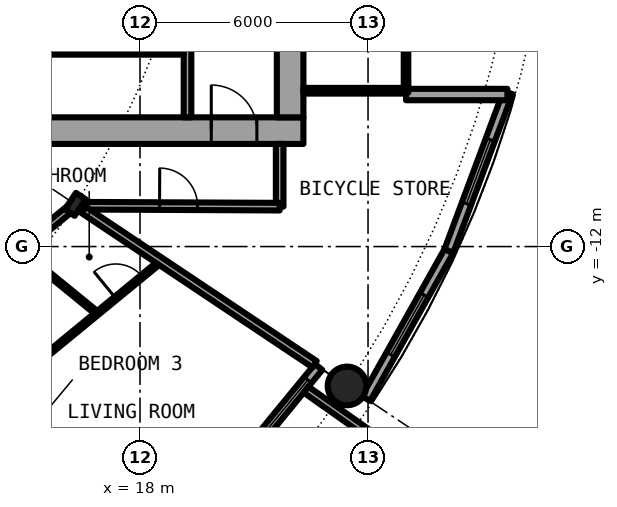
"""IFC4 building model, lengths in metres.
Left out: names, types, materials, properties, quantities, classifications, styles, units other than length and angle.
Written with IfcOpenShell. Run it as: python <this file> out.ifc"""

import sys

from ifc_helpers import new_model, si_unit, direction, frame, frame_2d, origin, origin_2d, place, context, subcontext, project, spatial, rectangle, hollow_circle, i_section, extrude, element, fill, save


model = new_model("IFC4")
c1 = context("Model", 3, precision=1e-05, world=origin(), true_north=direction((0.0, 1.0)))
c2 = subcontext(c1, "Body", "Model", "MODEL_VIEW")
j1 = project(units=[si_unit("LENGTHUNIT", "METRE"), si_unit("PLANEANGLEUNIT", "RADIAN")], contexts=[c1])
p1 = place(None, origin())
s1 = spatial("IfcSite", under=j1, at=p1, CompositionType="ELEMENT")
p2 = place(p1, origin())
s2 = spatial("IfcBuilding", under=s1, at=p2, CompositionType="ELEMENT")
p3 = place(p2, frame((0.0, 0.0, 63.6)))
s3 = spatial("IfcBuildingStorey", under=s2, at=p3, CompositionType="ELEMENT", Elevation=63.6)
p4 = place(p3, frame((23.448, -15.667, 0.0), z_axis=(0.0, 0.0, 1.0), x_axis=(1.0, 0.0, 0.0)))
e1 = element("IfcColumn", 1, at=p4, inside=s3, PredefinedType="COLUMN", context=c2, shape_type="SweptSolid", body=[
    extrude(hollow_circle(Radius=0.508, WallThickness=0.04, at=origin_2d()), origin(), (0.0, 0.0, 1.0), 3.05),
])
p5 = place(p3, frame((16.297, -10.889, 0.0), z_axis=(0.0, 0.0, 1.0), x_axis=(0.831469612303, -0.55557023302, 0.0)))
e2 = element("IfcColumn", 2, at=p5, inside=s3, PredefinedType="COLUMN", context=c2, shape_type="SweptSolid", body=[
    extrude(i_section(OverallWidth=0.306, OverallDepth=0.524, WebThickness=0.021, FlangeThickness=0.04, FilletRadius=0.027, at=origin_2d()), origin(), (0.0, 0.0, 1.0), 3.05),
])
p6 = place(p3, frame((19.304, -19.304, 0.0), z_axis=(0.0, 0.0, 1.0), x_axis=(0.634382322723, 0.773019449054, 0.0)))
e3 = element("IfcWall", 3, at=p6, inside=s3, PredefinedType="SOLIDWALL", context=c2, shape_type="SweptSolid", body=[
    extrude(rectangle(XDim=5.352, YDim=0.25, at=frame_2d((2.676, 0.0))), origin(), (0.0, 0.0, 1.0), 2.7),
])
p7 = place(p6, frame((0.841, 0.0, 0.0)))
e4 = element("IfcOpeningElement", 4, at=p7, cuts=e3, PredefinedType="OPENING", context=c2, shape_type="SweptSolid", body=[
    extrude(rectangle(XDim=1.0, YDim=2.2, at=frame_2d((0.5, 1.1))), frame((0.0, 0.135, 0.0), z_axis=(0.0, -1.0, 0.0), x_axis=(1.0, 0.0, 0.0)), (0.0, 0.0, 1.0), 0.27),
])
p8 = place(p6, frame((3.111, 0.0, 0.3)))
e5 = element("IfcOpeningElement", 5, at=p8, cuts=e3, PredefinedType="OPENING", context=c2, shape_type="SweptSolid", body=[
    extrude(rectangle(XDim=1.8, YDim=2.1, at=frame_2d((0.9, 1.05))), frame((0.0, 0.135, 0.0), z_axis=(0.0, -1.0, 0.0), x_axis=(1.0, 0.0, 0.0)), (0.0, 0.0, 1.0), 0.27),
])
p9 = place(p3, frame((22.37, -15.765, -0.03), z_axis=(0.0, 0.0, 1.0), x_axis=(0.817256123454, -0.576274612209, 0.0)))
e6 = element("IfcWall", 6, at=p9, inside=s3, PredefinedType="SOLIDWALL", context=c2, shape_type="SweptSolid", body=[
    extrude(rectangle(XDim=2.933, YDim=0.2, at=frame_2d((1.466, 0.0))), origin(), (0.0, 0.0, 1.0), 2.73),
])
p10 = place(p3, frame((23.946, -16.0, 0.0), z_axis=(0.0, 0.0, 1.0), x_axis=(0.489696356642, 0.871893042919, 0.0)))
e7 = element("IfcWall", 7, at=p10, inside=s3, PredefinedType="SOLIDWALL", context=c2, shape_type="SweptSolid", body=[
    extrude(rectangle(XDim=4.454, YDim=0.25, at=frame_2d((2.227, 0.0))), origin(), (0.0, 0.0, 1.0), 2.7),
])
p11 = place(p10, frame((1.327, 0.0, 0.3)))
e8 = element("IfcOpeningElement", 8, at=p11, cuts=e7, PredefinedType="OPENING", context=c2, shape_type="SweptSolid", body=[
    extrude(rectangle(XDim=1.8, YDim=2.1, at=frame_2d((0.9, 1.05))), frame((0.0, 0.135, 0.0), z_axis=(0.0, -1.0, 0.0), x_axis=(1.0, 0.0, 0.0)), (0.0, 0.0, 1.0), 0.27),
])
p12 = place(p3, frame((26.127, -12.117, 0.0), z_axis=(0.0, 0.0, 1.0), x_axis=(0.349247811493, 0.937030397675, 0.0)))
e9 = element("IfcWall", 9, at=p12, inside=s3, PredefinedType="SOLIDWALL", context=c2, shape_type="SweptSolid", body=[
    extrude(rectangle(XDim=4.452, YDim=0.25, at=frame_2d((2.226, 0.0))), origin(), (0.0, 0.0, 1.0), 2.7),
])
p13 = place(p12, frame((1.327, 0.0, 0.3)))
e10 = element("IfcOpeningElement", 10, at=p13, cuts=e9, PredefinedType="OPENING", context=c2, shape_type="SweptSolid", body=[
    extrude(rectangle(XDim=1.8, YDim=2.1, at=frame_2d((0.9, 1.05))), frame((0.0, 0.135, 0.0), z_axis=(0.0, -1.0, 0.0), x_axis=(1.0, 0.0, 0.0)), (0.0, 0.0, 1.0), 0.27),
])
p14 = place(p3, frame((25.0, -8.0, 0.0), z_axis=(0.0, 0.0, 1.0), x_axis=(1.0, 0.0, 0.0)))
e11 = element("IfcWall", 11, at=p14, inside=s3, PredefinedType="SOLIDWALL", context=c2, shape_type="SweptSolid", body=[
    extrude(rectangle(XDim=2.667, YDim=0.3, at=frame_2d((1.333, 0.0))), origin(), (0.0, 0.0, 1.0), 2.7),
])
p15 = place(p3, frame((8.3, -8.95, 0.0), z_axis=(0.0, 0.0, 1.0), x_axis=(1.0, 0.0, 0.0)))
e12 = element("IfcWall", 12, at=p15, inside=s3, PredefinedType="SHEAR", context=c2, shape_type="SweptSolid", body=[
    extrude(rectangle(XDim=14.0, YDim=0.7, at=frame_2d((7.0, 0.0))), origin(), (0.0, 0.0, 1.0), 3.05),
])
p16 = place(p15, frame((11.575, 0.0, 0.0)))
e13 = element("IfcOpeningElement", 13, at=p16, cuts=e12, PredefinedType="OPENING", context=c2, shape_type="SweptSolid", body=[
    extrude(rectangle(XDim=1.2, YDim=2.3, at=frame_2d((0.6, 1.15))), frame((0.0, 0.36, 0.0), z_axis=(0.0, -1.0, 0.0), x_axis=(1.0, 0.0, 0.0)), (0.0, 0.0, 1.0), 0.72),
])
p17 = place(p3, frame((21.95, 8.6, 0.0), z_axis=(0.0, 0.0, 1.0), x_axis=(0.0, -1.0, 0.0)))
e14 = element("IfcWall", 14, at=p17, inside=s3, PredefinedType="SHEAR", context=c2, shape_type="SweptSolid", body=[
    extrude(rectangle(XDim=17.2, YDim=0.7, at=frame_2d((8.6, 0.0))), origin(), (0.0, 0.0, 1.0), 3.05),
])
p18 = place(p17, frame((7.7, 0.0, 0.0)))
e15 = element("IfcOpeningElement", 15, at=p18, cuts=e14, PredefinedType="OPENING", context=c2, shape_type="SweptSolid", body=[
    extrude(rectangle(XDim=1.8, YDim=2.3, at=frame_2d((0.9, 1.15))), frame((0.0, 0.36, 0.0), z_axis=(0.0, -1.0, 0.0), x_axis=(1.0, 0.0, 0.0)), (0.0, 0.0, 1.0), 0.72),
])
p19 = place(p3, frame((19.25, -8.6, 0.0), z_axis=(0.0, 0.0, 1.0), x_axis=(0.0, 1.0, 0.0)))
e16 = element("IfcWall", 16, at=p19, inside=s3, PredefinedType="SOLIDWALL", context=c2, shape_type="SweptSolid", body=[
    extrude(rectangle(XDim=7.025, YDim=0.2, at=frame_2d((3.513, 0.0))), origin(), (0.0, 0.0, 1.0), 2.7),
])
p20 = place(p19, frame((2.35, 0.0, 0.0)))
e17 = element("IfcOpeningElement", 17, at=p20, cuts=e16, PredefinedType="OPENING", context=c2, shape_type="SweptSolid", body=[
    extrude(rectangle(XDim=1.1, YDim=2.3, at=frame_2d((0.55, 1.15))), frame((0.0, 0.11, 0.0), z_axis=(0.0, -1.0, 0.0), x_axis=(1.0, 0.0, 0.0)), (0.0, 0.0, 1.0), 0.22),
])
p21 = place(p3, frame((15.45, -6.875, 0.0), z_axis=(0.0, 0.0, 1.0), x_axis=(1.0, 0.0, 0.0)))
e18 = element("IfcWall", 18, at=p21, inside=s3, PredefinedType="PARTITIONING", context=c2, shape_type="SweptSolid", body=[
    extrude(rectangle(XDim=3.7, YDim=0.15, at=frame_2d((1.85, 0.0))), origin(), (0.0, 0.0, 1.0), 2.7),
])
p22 = place(p21, frame((1.4, 0.0, 0.0)))
e19 = element("IfcOpeningElement", 19, at=p22, cuts=e18, PredefinedType="OPENING", context=c2, shape_type="SweptSolid", body=[
    extrude(rectangle(XDim=0.9, YDim=2.3, at=frame_2d((0.45, 1.15))), frame((0.0, 0.085, 0.0), z_axis=(0.0, -1.0, 0.0), x_axis=(1.0, 0.0, 0.0)), (0.0, 0.0, 1.0), 0.17),
])
p23 = place(p3, frame((22.3, -7.9, 0.0), z_axis=(0.0, 0.0, 1.0), x_axis=(1.0, 0.0, 0.0)))
e20 = element("IfcWall", 20, at=p23, inside=s3, PredefinedType="PARTITIONING", context=c2, shape_type="SweptSolid", body=[
    extrude(rectangle(XDim=2.64, YDim=0.15, at=frame_2d((1.32, 0.0))), origin(), (0.0, 0.0, 1.0), 2.7),
])
p24 = place(p3, frame((25.0, 7.95, 0.0), z_axis=(0.0, 0.0, 1.0), x_axis=(0.0, -1.0, 0.0)))
e21 = element("IfcWall", 21, at=p24, inside=s3, PredefinedType="PARTITIONING", context=c2, shape_type="SweptSolid", body=[
    extrude(rectangle(XDim=15.9, YDim=0.12, at=frame_2d((7.95, 0.0))), origin(), (0.0, 0.0, 1.0), 2.7),
])
p25 = place(p24, frame((6.75, 0.0, 0.0)))
e22 = element("IfcOpeningElement", 22, at=p25, cuts=e21, PredefinedType="OPENING", context=c2, shape_type="SweptSolid", body=[
    extrude(rectangle(XDim=2.4, YDim=2.3, at=frame_2d((1.2, 1.15))), frame((0.0, 0.07, 0.0), z_axis=(0.0, -1.0, 0.0), x_axis=(1.0, 0.0, 0.0)), (0.0, 0.0, 1.0), 0.14),
])
p26 = place(p24, frame((11.55, 0.0, 0.1)))
e23 = element("IfcOpeningElement", 23, at=p26, cuts=e21, PredefinedType="OPENING", context=c2, shape_type="SweptSolid", body=[
    extrude(rectangle(XDim=3.4, YDim=2.35, at=frame_2d((1.7, 1.175))), frame((0.0, 0.07, 0.0), z_axis=(0.0, -1.0, 0.0), x_axis=(1.0, 0.0, 0.0)), (0.0, 0.0, 1.0), 0.14),
])
p27 = place(p24, frame((0.95, 0.0, 0.1)))
e24 = element("IfcOpeningElement", 24, at=p27, cuts=e21, PredefinedType="OPENING", context=c2, shape_type="SweptSolid", body=[
    extrude(rectangle(XDim=3.4, YDim=2.35, at=frame_2d((1.7, 1.175))), frame((0.0, 0.07, 0.0), z_axis=(0.0, -1.0, 0.0), x_axis=(1.0, 0.0, 0.0)), (0.0, 0.0, 1.0), 0.14),
])
p28 = place(p3, frame((21.675, -10.95, 0.0), z_axis=(0.0, 0.0, 1.0), x_axis=(0.0, 1.0, 0.0)))
e25 = element("IfcWall", 25, at=p28, inside=s3, PredefinedType="PARTITIONING", context=c2, shape_type="SweptSolid", body=[
    extrude(rectangle(XDim=1.65, YDim=0.2, at=frame_2d((0.825, 0.0))), origin(), (0.0, 0.0, 1.0), 2.7),
])
p29 = place(p3, frame((15.206, -15.127, 0.0), z_axis=(0.0, 0.0, 1.0), x_axis=(0.772975913823, 0.634435368379, 0.0)))
e26 = element("IfcWall", 26, at=p29, inside=s3, PredefinedType="PARTITIONING", context=c2, shape_type="SweptSolid", body=[
    extrude(rectangle(XDim=4.316, YDim=0.1, at=frame_2d((2.158, 0.0))), origin(), (0.0, 0.0, 1.0), 2.7),
])
p30 = place(p29, frame((2.787, 0.0, 0.0)))
e27 = element("IfcOpeningElement", 27, at=p30, cuts=e26, PredefinedType="OPENING", context=c2, shape_type="SweptSolid", body=[
    extrude(rectangle(XDim=0.9, YDim=2.3, at=frame_2d((0.45, 1.15))), frame((0.0, 0.06, 0.0), z_axis=(0.0, -1.0, 0.0), x_axis=(1.0, 0.0, 0.0)), (0.0, 0.0, 1.0), 0.12),
])
p31 = place(p3, frame((7.498, -18.109, 0.0), z_axis=(0.0, 0.0, 1.0), x_axis=(0.773076379635, 0.634312944256, 0.0)))
e28 = element("IfcWall", 28, at=p31, inside=s3, PredefinedType="PARTITIONING", context=c2, shape_type="SweptSolid", body=[
    extrude(rectangle(XDim=11.221, YDim=0.2, at=frame_2d((5.611, 0.0))), origin(), (0.0, 0.0, 1.0), 2.38),
])
p32 = place(p31, frame((6.132, 0.0, 0.0)))
e29 = element("IfcOpeningElement", 29, at=p32, cuts=e28, PredefinedType="OPENING", context=c2, shape_type="SweptSolid", body=[
    extrude(rectangle(XDim=1.0, YDim=2.3, at=frame_2d((0.5, 1.15))), frame((0.0, 0.11, 0.0), z_axis=(0.0, -1.0, 0.0), x_axis=(1.0, 0.0, 0.0)), (0.0, 0.0, 1.0), 0.22),
])
p33 = place(p3, frame((16.587, -10.926, 0.0), z_axis=(0.0, 0.0, 1.0), x_axis=(0.999988944514, -0.004702217579, 0.0)))
e30 = element("IfcWall", 30, at=p33, inside=s3, PredefinedType="PARTITIONING", context=c2, shape_type="SweptSolid", body=[
    extrude(rectangle(XDim=5.088, YDim=0.2, at=frame_2d((2.544, 0.0))), origin(), (0.0, 0.0, 1.0), 2.7),
])
p34 = place(p33, frame((1.927, 0.0, 0.0)))
e31 = element("IfcOpeningElement", 31, at=p34, cuts=e30, PredefinedType="OPENING", context=c2, shape_type="SweptSolid", body=[
    extrude(rectangle(XDim=1.0, YDim=2.3, at=frame_2d((0.5, 1.15))), frame((0.0, 0.11, 0.0), z_axis=(0.0, -1.0, 0.0), x_axis=(1.0, 0.0, 0.0)), (0.0, 0.0, 1.0), 0.22),
])
p35 = place(p3, frame((11.899, -14.499, 0.0), z_axis=(0.0, 0.0, 1.0), x_axis=(0.634396151441, -0.77300810024, 0.0)))
e32 = element("IfcWall", 32, at=p35, inside=s3, PredefinedType="PARTITIONING", context=c2, shape_type="SweptSolid", body=[
    extrude(rectangle(XDim=8.419, YDim=0.1, at=frame_2d((4.209, 0.0))), origin(), (0.0, 0.0, 1.0), 2.7),
])
p36 = place(p35, frame((0.842, 0.0, 0.0)))
e33 = element("IfcOpeningElement", 33, at=p36, cuts=e32, PredefinedType="OPENING", context=c2, shape_type="SweptSolid", body=[
    extrude(rectangle(XDim=0.9, YDim=2.3, at=frame_2d((0.45, 1.15))), frame((0.0, 0.06, 0.0), z_axis=(0.0, -1.0, 0.0), x_axis=(1.0, 0.0, 0.0)), (0.0, 0.0, 1.0), 0.12),
])
p37 = place(p35, frame((5.051, 0.0, 0.0)))
e34 = element("IfcOpeningElement", 34, at=p37, cuts=e32, PredefinedType="OPENING", context=c2, shape_type="SweptSolid", body=[
    extrude(rectangle(XDim=0.9, YDim=2.3, at=frame_2d((0.45, 1.15))), frame((0.0, 0.06, 0.0), z_axis=(0.0, -1.0, 0.0), x_axis=(1.0, 0.0, 0.0)), (0.0, 0.0, 1.0), 0.12),
])
p38 = place(p3, frame((14.831, -12.092, 0.0), z_axis=(0.0, 0.0, 1.0), x_axis=(0.774979608522, -0.631986239072, 0.0)))
e35 = element("IfcWall", 35, at=p38, inside=s3, PredefinedType="PARTITIONING", context=c2, shape_type="SweptSolid", body=[
    extrude(rectangle(XDim=2.636, YDim=0.1, at=frame_2d((1.318, 0.0))), origin(), (0.0, 0.0, 1.0), 2.7),
])
p39 = place(p3, frame((16.515, -11.035, 0.0), z_axis=(0.0, 0.0, 1.0), x_axis=(0.831505405283, -0.555516661303, 0.0)))
e36 = element("IfcWall", 36, at=p39, inside=s3, PredefinedType="PARTITIONING", context=c2, shape_type="SweptSolid", body=[
    extrude(rectangle(XDim=7.312, YDim=0.2, at=frame_2d((3.656, 0.0))), origin(), (0.0, 0.0, 1.0), 2.7),
])
p40 = place(p8, origin())
e37 = element("IfcWindow", 37, at=p40, inside=s3, PartitioningType="SINGLE_PANEL", PredefinedType="WINDOW", context=c2, shape_type="SweptSolid", body=[
    extrude(rectangle(XDim=1.8, YDim=2.1, at=frame_2d((0.9, 1.05))), frame((0.0, 0.03, 0.0), z_axis=(0.0, -1.0, 0.0), x_axis=(1.0, 0.0, 0.0)), (0.0, 0.0, 1.0), 0.06),
])
fill(e5, e37)
p41 = place(p11, origin())
e38 = element("IfcWindow", 38, at=p41, inside=s3, PartitioningType="SINGLE_PANEL", PredefinedType="WINDOW", context=c2, shape_type="SweptSolid", body=[
    extrude(rectangle(XDim=1.8, YDim=2.1, at=frame_2d((0.9, 1.05))), frame((0.0, 0.03, 0.0), z_axis=(0.0, -1.0, 0.0), x_axis=(1.0, 0.0, 0.0)), (0.0, 0.0, 1.0), 0.06),
])
fill(e8, e38)
p42 = place(p13, origin())
e39 = element("IfcWindow", 39, at=p42, inside=s3, PartitioningType="SINGLE_PANEL", PredefinedType="WINDOW", context=c2, shape_type="SweptSolid", body=[
    extrude(rectangle(XDim=1.8, YDim=2.1, at=frame_2d((0.9, 1.05))), frame((0.0, 0.03, 0.0), z_axis=(0.0, -1.0, 0.0), x_axis=(1.0, 0.0, 0.0)), (0.0, 0.0, 1.0), 0.06),
])
fill(e10, e39)
p43 = place(p22, origin())
e40 = element("IfcDoor", 40, at=p43, inside=s3, OperationType="SINGLE_SWING_LEFT", PredefinedType="DOOR", context=c2, shape_type="SweptSolid", body=[
    extrude(rectangle(XDim=0.9, YDim=2.3, at=frame_2d((0.45, 1.15))), frame((0.0, 0.025, 0.0), z_axis=(0.0, -1.0, 0.0), x_axis=(1.0, 0.0, 0.0)), (0.0, 0.0, 1.0), 0.05),
])
fill(e19, e40)
p44 = place(p16, origin())
e41 = element("IfcDoor", 41, at=p44, inside=s3, OperationType="SINGLE_SWING_LEFT", PredefinedType="DOOR", context=c2, shape_type="SweptSolid", body=[
    extrude(rectangle(XDim=1.2, YDim=2.3, at=frame_2d((0.6, 1.15))), frame((0.0, 0.025, 0.0), z_axis=(0.0, -1.0, 0.0), x_axis=(1.0, 0.0, 0.0)), (0.0, 0.0, 1.0), 0.05),
])
fill(e13, e41)
p45 = place(p26, origin())
e42 = element("IfcWindow", 42, at=p45, inside=s3, PartitioningType="SINGLE_PANEL", PredefinedType="WINDOW", context=c2, shape_type="SweptSolid", body=[
    extrude(rectangle(XDim=3.4, YDim=2.35, at=frame_2d((1.7, 1.175))), frame((0.0, 0.03, 0.0), z_axis=(0.0, -1.0, 0.0), x_axis=(1.0, 0.0, 0.0)), (0.0, 0.0, 1.0), 0.06),
])
fill(e23, e42)
p46 = place(p30, origin())
e43 = element("IfcDoor", 43, at=p46, inside=s3, OperationType="SINGLE_SWING_RIGHT", PredefinedType="DOOR", context=c2, shape_type="SweptSolid", body=[
    extrude(rectangle(XDim=0.9, YDim=2.3, at=frame_2d((0.45, 1.15))), frame((0.0, 0.025, 0.0), z_axis=(0.0, -1.0, 0.0), x_axis=(1.0, 0.0, 0.0)), (0.0, 0.0, 1.0), 0.05),
])
fill(e27, e43)
p47 = place(p34, origin())
e44 = element("IfcDoor", 44, at=p47, inside=s3, OperationType="SINGLE_SWING_LEFT", PredefinedType="DOOR", context=c2, shape_type="SweptSolid", body=[
    extrude(rectangle(XDim=1.0, YDim=2.3, at=frame_2d((0.5, 1.15))), frame((0.0, 0.025, 0.0), z_axis=(0.0, -1.0, 0.0), x_axis=(1.0, 0.0, 0.0)), (0.0, 0.0, 1.0), 0.05),
])
fill(e31, e44)
save(model, sys.argv[1])
